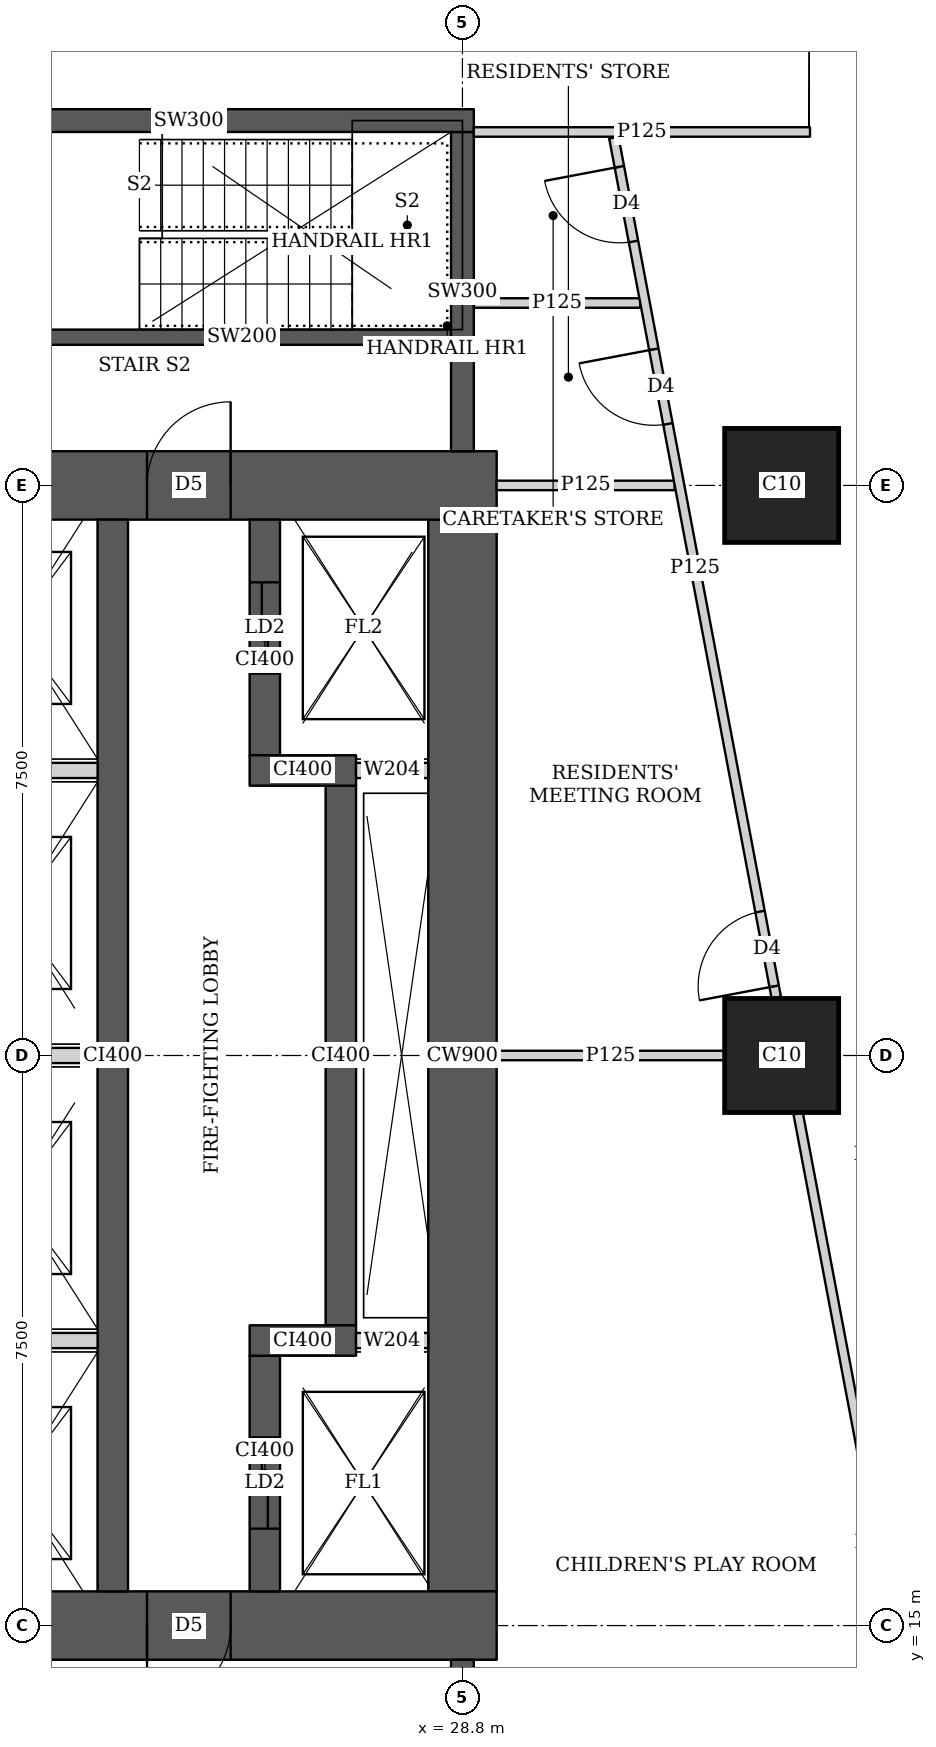
"""IFC4 building model, lengths in metres.
Left out: names, types, materials, properties, quantities, classifications, styles, units other than length and angle.
Written with IfcOpenShell. Run it as: python <this file> out.ifc"""

import sys

from ifc_helpers import new_model, si_unit, direction, frame, frame_2d, origin, origin_2d, place, context, subcontext, project, spatial, rectangle, extrude, element, fill, save


model = new_model("IFC4")
c1 = context("Model", 3, precision=1e-05, world=origin(), true_north=direction((0.0, 1.0)))
c2 = subcontext(c1, "Body", "Model", "MODEL_VIEW")
j1 = project(units=[si_unit("LENGTHUNIT", "METRE"), si_unit("PLANEANGLEUNIT", "RADIAN")], contexts=[c1])
p1 = place(None, origin())
s1 = spatial("IfcSite", under=j1, at=p1, CompositionType="ELEMENT")
p2 = place(p1, origin())
s2 = spatial("IfcBuilding", under=s1, at=p2, CompositionType="ELEMENT")
p3 = place(p2, frame((0.0, 0.0, 180.8)))
s3 = spatial("IfcBuildingStorey", under=s2, at=p3, CompositionType="ELEMENT", Elevation=180.8)
for number, where, z_axis, x_axis in (
    (1, (33.0, 22.5, 0.0), (0.0, 0.0, 1.0), (1.0, 0.0, 0.0)),
    (2, (33.0, 30.0, 0.0), (0.0, 0.0, 1.0), (1.0, 0.0, 0.0)),
):
    element("IfcColumn", number, at=place(p3, frame(where, z_axis=z_axis, x_axis=x_axis)), inside=s3, PredefinedType="COLUMN", context=c2, shape_type="SweptSolid", body=[
        extrude(rectangle(XDim=1.5, YDim=1.5, at=origin_2d()), origin(), (0.0, 0.0, 1.0), 3.75),
    ])
p4 = place(p3, frame((13.95, 15.0, 0.0), z_axis=(0.0, 0.0, 1.0), x_axis=(1.0, 0.0, 0.0)))
e3 = element("IfcWall", 3, at=p4, inside=s3, PredefinedType="SHEAR", context=c2, shape_type="SweptSolid", body=[
    extrude(rectangle(XDim=15.3, YDim=0.9, at=frame_2d((7.65, 0.0))), origin(), (0.0, 0.0, 1.0), 3.75),
])
p5 = place(p4, frame((4.45, 0.0, 0.0)))
e4 = element("IfcOpeningElement", 4, at=p5, cuts=e3, PredefinedType="OPENING", context=c2, shape_type="SweptSolid", body=[
    extrude(rectangle(XDim=1.8, YDim=2.1, at=frame_2d((0.9, 1.05))), frame((0.0, 0.46, 0.0), z_axis=(0.0, -1.0, 0.0), x_axis=(1.0, 0.0, 0.0)), (0.0, 0.0, 1.0), 0.92),
])
p6 = place(p4, frame((10.7, 0.0, 0.0)))
e5 = element("IfcOpeningElement", 5, at=p6, cuts=e3, PredefinedType="OPENING", context=c2, shape_type="SweptSolid", body=[
    extrude(rectangle(XDim=1.1, YDim=2.1, at=frame_2d((0.55, 1.05))), frame((0.0, 0.46, 0.0), z_axis=(0.0, -1.0, 0.0), x_axis=(1.0, 0.0, 0.0)), (0.0, 0.0, 1.0), 0.92),
])
p7 = place(p3, frame((13.95, 30.0, 0.0), z_axis=(0.0, 0.0, 1.0), x_axis=(1.0, 0.0, 0.0)))
e6 = element("IfcWall", 6, at=p7, inside=s3, PredefinedType="SHEAR", context=c2, shape_type="SweptSolid", body=[
    extrude(rectangle(XDim=15.3, YDim=0.9, at=frame_2d((7.65, 0.0))), origin(), (0.0, 0.0, 1.0), 3.75),
])
p8 = place(p7, frame((4.45, 0.0, 0.0)))
e7 = element("IfcOpeningElement", 7, at=p8, cuts=e6, PredefinedType="OPENING", context=c2, shape_type="SweptSolid", body=[
    extrude(rectangle(XDim=1.8, YDim=2.1, at=frame_2d((0.9, 1.05))), frame((0.0, 0.46, 0.0), z_axis=(0.0, -1.0, 0.0), x_axis=(1.0, 0.0, 0.0)), (0.0, 0.0, 1.0), 0.92),
])
p9 = place(p7, frame((10.7, 0.0, 0.0)))
e8 = element("IfcOpeningElement", 8, at=p9, cuts=e6, PredefinedType="OPENING", context=c2, shape_type="SweptSolid", body=[
    extrude(rectangle(XDim=1.1, YDim=2.1, at=frame_2d((0.55, 1.05))), frame((0.0, 0.46, 0.0), z_axis=(0.0, -1.0, 0.0), x_axis=(1.0, 0.0, 0.0)), (0.0, 0.0, 1.0), 0.92),
])
p10 = place(p3, frame((28.8, 15.45, 0.0), z_axis=(0.0, 0.0, 1.0), x_axis=(0.0, 1.0, 0.0)))
e9 = element("IfcWall", 9, at=p10, inside=s3, PredefinedType="SHEAR", context=c2, shape_type="SweptSolid", body=[
    extrude(rectangle(XDim=14.1, YDim=0.9, at=frame_2d((7.05, 0.0))), origin(), (0.0, 0.0, 1.0), 3.75),
])
p11 = place(p3, frame((24.2, 15.45, 0.0), z_axis=(0.0, 0.0, 1.0), x_axis=(0.0, 1.0, 0.0)))
e10 = element("IfcWall", 10, at=p11, inside=s3, PredefinedType="SHEAR", context=c2, shape_type="SweptSolid", body=[
    extrude(rectangle(XDim=14.1, YDim=0.4, at=frame_2d((7.05, 0.0))), origin(), (0.0, 0.0, 1.0), 3.75),
])
p12 = place(p3, frame((26.2, 15.45, 0.0), z_axis=(0.0, 0.0, 1.0), x_axis=(0.0, 1.0, 0.0)))
e11 = element("IfcWall", 11, at=p12, inside=s3, PredefinedType="SHEAR", context=c2, shape_type="SweptSolid", body=[
    extrude(rectangle(XDim=3.1, YDim=0.4, at=frame_2d((1.55, 0.0))), origin(), (0.0, 0.0, 1.0), 3.75),
])
p13 = place(p12, frame((0.825, 0.0, 0.0)))
e12 = element("IfcOpeningElement", 12, at=p13, cuts=e11, PredefinedType="OPENING", context=c2, shape_type="SweptSolid", body=[
    extrude(rectangle(XDim=1.2, YDim=2.1, at=frame_2d((0.6, 1.05))), frame((0.0, 0.21, 0.0), z_axis=(0.0, -1.0, 0.0), x_axis=(1.0, 0.0, 0.0)), (0.0, 0.0, 1.0), 0.42),
])
p14 = place(p3, frame((26.0, 18.75, 0.0), z_axis=(0.0, 0.0, 1.0), x_axis=(1.0, 0.0, 0.0)))
e13 = element("IfcWall", 13, at=p14, inside=s3, PredefinedType="SHEAR", context=c2, shape_type="SweptSolid", body=[
    extrude(rectangle(XDim=1.4, YDim=0.4, at=frame_2d((0.7, 0.0))), origin(), (0.0, 0.0, 1.0), 3.75),
])
p15 = place(p3, frame((27.2, 18.95, 0.0), z_axis=(0.0, 0.0, 1.0), x_axis=(0.0, 1.0, 0.0)))
e14 = element("IfcWall", 14, at=p15, inside=s3, PredefinedType="SHEAR", context=c2, shape_type="SweptSolid", body=[
    extrude(rectangle(XDim=7.1, YDim=0.4, at=frame_2d((3.55, 0.0))), origin(), (0.0, 0.0, 1.0), 3.75),
])
p16 = place(p3, frame((26.0, 26.25, 0.0), z_axis=(0.0, 0.0, 1.0), x_axis=(1.0, 0.0, 0.0)))
e15 = element("IfcWall", 15, at=p16, inside=s3, PredefinedType="SHEAR", context=c2, shape_type="SweptSolid", body=[
    extrude(rectangle(XDim=1.4, YDim=0.4, at=frame_2d((0.7, 0.0))), origin(), (0.0, 0.0, 1.0), 3.75),
])
p17 = place(p3, frame((26.2, 26.45, 0.0), z_axis=(0.0, 0.0, 1.0), x_axis=(0.0, 1.0, 0.0)))
e16 = element("IfcWall", 16, at=p17, inside=s3, PredefinedType="SHEAR", context=c2, shape_type="SweptSolid", body=[
    extrude(rectangle(XDim=3.1, YDim=0.4, at=frame_2d((1.55, 0.0))), origin(), (0.0, 0.0, 1.0), 3.75),
])
p18 = place(p17, frame((1.075, 0.0, 0.0)))
e17 = element("IfcOpeningElement", 17, at=p18, cuts=e16, PredefinedType="OPENING", context=c2, shape_type="SweptSolid", body=[
    extrude(rectangle(XDim=1.2, YDim=2.1, at=frame_2d((0.6, 1.05))), frame((0.0, 0.21, 0.0), z_axis=(0.0, -1.0, 0.0), x_axis=(1.0, 0.0, 0.0)), (0.0, 0.0, 1.0), 0.42),
])
p19 = place(p3, frame((28.8, 10.35, 0.0), z_axis=(0.0, 0.0, 1.0), x_axis=(0.0, 1.0, 0.0)))
e18 = element("IfcWall", 18, at=p19, inside=s3, PredefinedType="SHEAR", context=c2, shape_type="SweptSolid", body=[
    extrude(rectangle(XDim=4.2, YDim=0.3, at=frame_2d((2.1, 0.0))), origin(), (0.0, 0.0, 1.0), 3.75),
])
p20 = place(p3, frame((21.45, 34.8, 0.0), z_axis=(0.0, 0.0, 1.0), x_axis=(1.0, 0.0, 0.0)))
e19 = element("IfcWall", 19, at=p20, inside=s3, PredefinedType="SHEAR", context=c2, shape_type="SweptSolid", body=[
    extrude(rectangle(XDim=7.5, YDim=0.3, at=frame_2d((3.75, 0.0))), origin(), (0.0, 0.0, 1.0), 3.75),
])
p21 = place(p20, frame((0.5, 0.0, 0.0)))
e20 = element("IfcOpeningElement", 20, at=p21, cuts=e19, PredefinedType="OPENING", context=c2, shape_type="SweptSolid", body=[
    extrude(rectangle(XDim=1.1, YDim=2.1, at=frame_2d((0.55, 1.05))), frame((0.0, 0.16, 0.0), z_axis=(0.0, -1.0, 0.0), x_axis=(1.0, 0.0, 0.0)), (0.0, 0.0, 1.0), 0.32),
])
p22 = place(p3, frame((28.8, 30.45, 0.0), z_axis=(0.0, 0.0, 1.0), x_axis=(0.0, 1.0, 0.0)))
e21 = element("IfcWall", 21, at=p22, inside=s3, PredefinedType="SHEAR", context=c2, shape_type="SweptSolid", body=[
    extrude(rectangle(XDim=4.2, YDim=0.3, at=frame_2d((2.1, 0.0))), origin(), (0.0, 0.0, 1.0), 3.75),
])
p23 = place(p3, frame((33.623, 43.022, 0.0), z_axis=(0.0, 0.0, 1.0), x_axis=(0.185596841028, -0.98262597798, 0.0)))
e22 = element("IfcWall", 22, at=p23, inside=s3, PredefinedType="SOLIDWALL", context=c2, shape_type="SweptSolid", body=[
    extrude(rectangle(XDim=41.66, YDim=0.15, at=frame_2d((20.83, 0.0))), origin(), (0.0, 0.0, 1.0), 2.5),
])
p24 = place(p23, frame((8.034, 0.0, 0.0)))
e23 = element("IfcOpeningElement", 23, at=p24, cuts=e22, PredefinedType="OPENING", context=c2, shape_type="SweptSolid", body=[
    extrude(rectangle(XDim=1.0, YDim=2.1, at=frame_2d((0.5, 1.05))), frame((0.0, 0.085, 0.0), z_axis=(0.0, -1.0, 0.0), x_axis=(1.0, 0.0, 0.0)), (0.0, 0.0, 1.0), 0.17),
])
p25 = place(p23, frame((12.611, 0.0, 0.0)))
e24 = element("IfcOpeningElement", 24, at=p25, cuts=e22, PredefinedType="OPENING", context=c2, shape_type="SweptSolid", body=[
    extrude(rectangle(XDim=1.0, YDim=2.1, at=frame_2d((0.5, 1.05))), frame((0.0, 0.085, 0.0), z_axis=(0.0, -1.0, 0.0), x_axis=(1.0, 0.0, 0.0)), (0.0, 0.0, 1.0), 0.17),
])
p26 = place(p23, frame((20.242, 0.0, 0.0)))
e25 = element("IfcOpeningElement", 25, at=p26, cuts=e22, PredefinedType="OPENING", context=c2, shape_type="SweptSolid", body=[
    extrude(rectangle(XDim=1.0, YDim=2.1, at=frame_2d((0.5, 1.05))), frame((0.0, 0.085, 0.0), z_axis=(0.0, -1.0, 0.0), x_axis=(1.0, 0.0, 0.0)), (0.0, 0.0, 1.0), 0.17),
])
p27 = place(p23, frame((31.206, 0.0, 0.0)))
e26 = element("IfcOpeningElement", 26, at=p27, cuts=e22, PredefinedType="OPENING", context=c2, shape_type="SweptSolid", body=[
    extrude(rectangle(XDim=1.0, YDim=2.1, at=frame_2d((0.5, 1.05))), frame((0.0, 0.085, 0.0), z_axis=(0.0, -1.0, 0.0), x_axis=(1.0, 0.0, 0.0)), (0.0, 0.0, 1.0), 0.17),
])
p28 = place(p3, frame((28.95, 34.65, 0.0), z_axis=(0.0, 0.0, 1.0), x_axis=(1.0, 0.0, 0.0)))
e27 = element("IfcWall", 27, at=p28, inside=s3, PredefinedType="PARTITIONING", context=c2, shape_type="SweptSolid", body=[
    extrude(rectangle(XDim=4.423, YDim=0.125, at=frame_2d((2.211, 0.0))), origin(), (0.0, 0.0, 1.0), 3.5),
])
p29 = place(p3, frame((35.354, 10.424, 0.0), z_axis=(0.0, 0.0, 1.0), x_axis=(-0.185612234763, 0.982623070311, 0.0)))
e28 = element("IfcWall", 28, at=p29, inside=s3, PredefinedType="PARTITIONING", context=c2, shape_type="SweptSolid", body=[
    extrude(rectangle(XDim=11.513, YDim=0.125, at=frame_2d((5.756, 0.0))), origin(), (0.0, 0.0, 1.0), 3.5),
])
p30 = place(p29, frame((0.697, 0.0, 0.0)))
e29 = element("IfcOpeningElement", 29, at=p30, cuts=e28, PredefinedType="OPENING", context=c2, shape_type="SweptSolid", body=[
    extrude(rectangle(XDim=1.0, YDim=2.1, at=frame_2d((0.5, 1.05))), frame((0.0, 0.073, 0.0), z_axis=(0.0, -1.0, 0.0), x_axis=(1.0, 0.0, 0.0)), (0.0, 0.0, 1.0), 0.145),
])
p31 = place(p3, frame((32.929, 23.263, 0.0), z_axis=(0.0, 0.0, 1.0), x_axis=(-0.185612234763, 0.982623070311, 0.0)))
e30 = element("IfcWall", 30, at=p31, inside=s3, PredefinedType="PARTITIONING", context=c2, shape_type="SweptSolid", body=[
    extrude(rectangle(XDim=11.513, YDim=0.125, at=frame_2d((5.756, 0.0))), origin(), (0.0, 0.0, 1.0), 3.5),
])
p32 = place(p31, frame((0.15, 0.0, 0.0)))
e31 = element("IfcOpeningElement", 31, at=p32, cuts=e30, PredefinedType="OPENING", context=c2, shape_type="SweptSolid", body=[
    extrude(rectangle(XDim=1.0, YDim=2.1, at=frame_2d((0.5, 1.05))), frame((0.0, 0.073, 0.0), z_axis=(0.0, -1.0, 0.0), x_axis=(1.0, 0.0, 0.0)), (0.0, 0.0, 1.0), 0.145),
])
p33 = place(p31, frame((7.679, 0.0, 0.0)))
e32 = element("IfcOpeningElement", 32, at=p33, cuts=e30, PredefinedType="OPENING", context=c2, shape_type="SweptSolid", body=[
    extrude(rectangle(XDim=1.0, YDim=2.1, at=frame_2d((0.5, 1.05))), frame((0.0, 0.073, 0.0), z_axis=(0.0, -1.0, 0.0), x_axis=(1.0, 0.0, 0.0)), (0.0, 0.0, 1.0), 0.145),
])
p34 = place(p31, frame((10.122, 0.0, 0.0)))
e33 = element("IfcOpeningElement", 33, at=p34, cuts=e30, PredefinedType="OPENING", context=c2, shape_type="SweptSolid", body=[
    extrude(rectangle(XDim=1.0, YDim=2.1, at=frame_2d((0.5, 1.05))), frame((0.0, 0.073, 0.0), z_axis=(0.0, -1.0, 0.0), x_axis=(1.0, 0.0, 0.0)), (0.0, 0.0, 1.0), 0.145),
])
p35 = place(p3, frame((29.25, 22.5, 0.0), z_axis=(0.0, 0.0, 1.0), x_axis=(1.0, 0.0, 0.0)))
e34 = element("IfcWall", 34, at=p35, inside=s3, PredefinedType="PARTITIONING", context=c2, shape_type="SweptSolid", body=[
    extrude(rectangle(XDim=2.999, YDim=0.125, at=frame_2d((1.5, 0.0))), origin(), (0.0, 0.0, 1.0), 3.5),
])
p36 = place(p3, frame((29.25, 30.0, 0.0), z_axis=(0.0, 0.0, 1.0), x_axis=(1.0, 0.0, 0.0)))
e35 = element("IfcWall", 35, at=p36, inside=s3, PredefinedType="PARTITIONING", context=c2, shape_type="SweptSolid", body=[
    extrude(rectangle(XDim=2.342, YDim=0.125, at=frame_2d((1.171, 0.0))), origin(), (0.0, 0.0, 1.0), 3.5),
])
p37 = place(p3, frame((28.95, 32.4, 0.0), z_axis=(0.0, 0.0, 1.0), x_axis=(1.0, 0.0, 0.0)))
e36 = element("IfcWall", 36, at=p37, inside=s3, PredefinedType="PARTITIONING", context=c2, shape_type="SweptSolid", body=[
    extrude(rectangle(XDim=2.189, YDim=0.125, at=frame_2d((1.094, 0.0))), origin(), (0.0, 0.0, 1.0), 3.5),
])
p38 = place(p3, frame((23.0, 31.95, 0.0), z_axis=(0.0, 0.0, 1.0), x_axis=(1.0, 0.0, 0.0)))
e37 = element("IfcWall", 37, at=p38, inside=s3, PredefinedType="SHEAR", context=c2, shape_type="SweptSolid", body=[
    extrude(rectangle(XDim=5.8, YDim=0.2, at=frame_2d((2.9, 0.0))), origin(), (0.0, 0.0, 1.0), 3.75),
])
for number, where, z_axis, x_axis in (
    (38, (21.8, 18.75, 0.0), (0.0, 0.0, 1.0), (1.0, 0.0, 0.0)),
    (39, (21.8, 22.5, 0.0), (0.0, 0.0, 1.0), (1.0, 0.0, 0.0)),
    (40, (21.8, 26.25, 0.0), (0.0, 0.0, 1.0), (1.0, 0.0, 0.0)),
):
    element("IfcWall", number, at=place(p3, frame(where, z_axis=z_axis, x_axis=x_axis)), inside=s3, PredefinedType="SOLIDWALL", context=c2, shape_type="SweptSolid", body=[
        extrude(rectangle(XDim=2.2, YDim=0.2, at=frame_2d((1.1, 0.0))), origin(), (0.0, 0.0, 1.0), 3.5),
    ])
for number, where, z_axis, x_axis in (
    (41, (27.4, 18.75, 0.0), (0.0, 0.0, 1.0), (1.0, 0.0, 0.0)),
    (42, (27.4, 26.25, 0.0), (0.0, 0.0, 1.0), (1.0, 0.0, 0.0)),
):
    element("IfcWall", number, at=place(p3, frame(where, z_axis=z_axis, x_axis=x_axis)), inside=s3, PredefinedType="SOLIDWALL", context=c2, shape_type="SweptSolid", body=[
        extrude(rectangle(XDim=0.95, YDim=0.2, at=frame_2d((0.475, 0.0))), origin(), (0.0, 0.0, 1.0), 3.5),
    ])
p39 = place(p32, origin())
e43 = element("IfcDoor", 43, at=p39, inside=s3, OperationType="SINGLE_SWING_LEFT", PredefinedType="DOOR", context=c2, shape_type="SweptSolid", body=[
    extrude(rectangle(XDim=1.0, YDim=2.1, at=frame_2d((0.5, 1.05))), frame((0.0, 0.025, 0.0), z_axis=(0.0, -1.0, 0.0), x_axis=(1.0, 0.0, 0.0)), (0.0, 0.0, 1.0), 0.05),
])
fill(e31, e43)
p40 = place(p33, origin())
e44 = element("IfcDoor", 44, at=p40, inside=s3, OperationType="SINGLE_SWING_RIGHT", PredefinedType="DOOR", context=c2, shape_type="SweptSolid", body=[
    extrude(rectangle(XDim=1.0, YDim=2.1, at=frame_2d((0.5, 1.05))), frame((0.0, 0.025, 0.0), z_axis=(0.0, -1.0, 0.0), x_axis=(1.0, 0.0, 0.0)), (0.0, 0.0, 1.0), 0.05),
])
fill(e32, e44)
p41 = place(p34, origin())
e45 = element("IfcDoor", 45, at=p41, inside=s3, OperationType="SINGLE_SWING_RIGHT", PredefinedType="DOOR", context=c2, shape_type="SweptSolid", body=[
    extrude(rectangle(XDim=1.0, YDim=2.1, at=frame_2d((0.5, 1.05))), frame((0.0, 0.025, 0.0), z_axis=(0.0, -1.0, 0.0), x_axis=(1.0, 0.0, 0.0)), (0.0, 0.0, 1.0), 0.05),
])
fill(e33, e45)
p42 = place(p6, origin())
e46 = element("IfcDoor", 46, at=p42, inside=s3, OperationType="SINGLE_SWING_RIGHT", PredefinedType="DOOR", context=c2, shape_type="SweptSolid", body=[
    extrude(rectangle(XDim=1.1, YDim=2.1, at=frame_2d((0.55, 1.05))), frame((0.0, 0.025, 0.0), z_axis=(0.0, -1.0, 0.0), x_axis=(1.0, 0.0, 0.0)), (0.0, 0.0, 1.0), 0.05),
])
fill(e5, e46)
p43 = place(p9, origin())
e47 = element("IfcDoor", 47, at=p43, inside=s3, OperationType="SINGLE_SWING_RIGHT", PredefinedType="DOOR", context=c2, shape_type="SweptSolid", body=[
    extrude(rectangle(XDim=1.1, YDim=2.1, at=frame_2d((0.55, 1.05))), frame((0.0, 0.025, 0.0), z_axis=(0.0, -1.0, 0.0), x_axis=(1.0, 0.0, 0.0)), (0.0, 0.0, 1.0), 0.05),
])
fill(e8, e47)
p44 = place(p13, origin())
e48 = element("IfcDoor", 48, at=p44, inside=s3, OperationType="DOUBLE_DOOR_SLIDING", PredefinedType="DOOR", context=c2, shape_type="SweptSolid", body=[
    extrude(rectangle(XDim=1.2, YDim=2.1, at=frame_2d((0.6, 1.05))), frame((0.0, 0.025, 0.0), z_axis=(0.0, -1.0, 0.0), x_axis=(1.0, 0.0, 0.0)), (0.0, 0.0, 1.0), 0.05),
])
fill(e12, e48)
p45 = place(p18, origin())
e49 = element("IfcDoor", 49, at=p45, inside=s3, OperationType="DOUBLE_DOOR_SLIDING", PredefinedType="DOOR", context=c2, shape_type="SweptSolid", body=[
    extrude(rectangle(XDim=1.2, YDim=2.1, at=frame_2d((0.6, 1.05))), frame((0.0, 0.025, 0.0), z_axis=(0.0, -1.0, 0.0), x_axis=(1.0, 0.0, 0.0)), (0.0, 0.0, 1.0), 0.05),
])
fill(e17, e49)
save(model, sys.argv[1])
